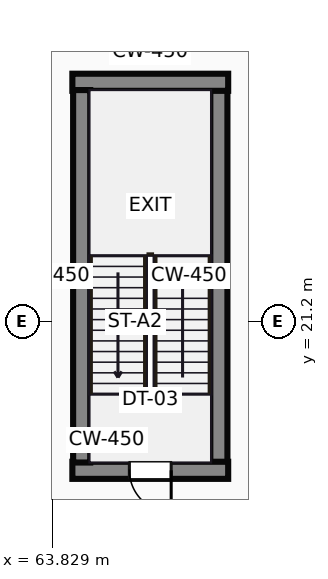
"""IFC4 building model, lengths in metres.
Left out: names, types, materials, properties, quantities, classifications, styles, units other than length and angle.
Written with IfcOpenShell. Run it as: python <this file> out.ifc"""

import sys

from ifc_helpers import new_model, si_unit, direction, frame, frame_2d, origin, place, context, subcontext, project, spatial, rectangle, extrude, source, transform, mapped, element, fill, save


model = new_model("IFC4")
c1 = context("Model", 3, precision=1e-05, world=origin(), true_north=direction((0.0, 1.0)))
c2 = subcontext(c1, "Body", "Model", "MODEL_VIEW")
j1 = project(units=[si_unit("LENGTHUNIT", "METRE"), si_unit("PLANEANGLEUNIT", "RADIAN")], contexts=[c1])
p1 = place(None, origin())
s1 = spatial("IfcSite", under=j1, at=p1, CompositionType="ELEMENT")
p2 = place(p1, origin())
s2 = spatial("IfcBuilding", under=s1, at=p2, CompositionType="ELEMENT")
p3 = place(p2, frame((0.0, 0.0, 16.0)))
s3 = spatial("IfcBuildingStorey", under=s2, at=p3, CompositionType="ELEMENT", Elevation=16.0)
m1 = source(origin(), c2, "Body", "SweptSolid", [
    extrude(rectangle(XDim=4.1, YDim=0.45, at=frame_2d((2.05, 0.0))), origin(), (0.0, 0.0, 1.0), 5.0),
])
p4 = place(p3, frame((64.35, 17.295, 0.0), z_axis=(0.0, 0.0, 1.0), x_axis=(1.0, 0.0, 0.0)))
e1 = element("IfcWall", 1, at=p4, inside=s3, PredefinedType="SHEAR", context=c2, shape_type="MappedRepresentation", body=[
    mapped(m1, transform((0.0, 0.0, 0.0))),
])
p5 = place(p4, frame((1.5, 0.0, 0.0)))
e2 = element("IfcOpeningElement", 2, at=p5, cuts=e1, PredefinedType="OPENING", context=c2, shape_type="SweptSolid", body=[
    extrude(rectangle(XDim=1.1, YDim=2.15, at=frame_2d((0.55, 1.075))), frame((0.0, 0.235, 0.0), z_axis=(0.0, -1.0, 0.0), x_axis=(1.0, 0.0, 0.0)), (0.0, 0.0, 1.0), 0.47),
])
m2 = source(origin(), c2, "Body", "SweptSolid", [
    extrude(rectangle(XDim=9.8, YDim=0.45, at=frame_2d((4.9, 0.0))), origin(), (0.0, 0.0, 1.0), 5.0),
])
for number, where, z_axis, x_axis in (
    (3, (64.595, 17.5, 0.0), (0.0, 0.0, 1.0), (0.0, 1.0, 0.0)),
    (4, (68.205, 17.5, 0.0), (0.0, 0.0, 1.0), (0.0, 1.0, 0.0)),
):
    element("IfcWall", number, at=place(p3, frame(where, z_axis=z_axis, x_axis=x_axis)), inside=s3, PredefinedType="SHEAR", context=c2, shape_type="MappedRepresentation", body=[
        mapped(m2, transform((0.0, 0.0, 0.0))),
    ])
p6 = place(p3, frame((64.35, 27.505, 0.0), z_axis=(0.0, 0.0, 1.0), x_axis=(1.0, 0.0, 0.0)))
e5 = element("IfcWall", 5, at=p6, inside=s3, PredefinedType="SHEAR", context=c2, shape_type="MappedRepresentation", body=[
    mapped(m1, transform((0.0, 0.0, 0.0))),
])
m3 = source(origin(), c2, "Body", "SweptSolid", [
    extrude(rectangle(XDim=1.1, YDim=2.15, at=frame_2d((0.55, 1.075))), frame((0.0, 0.025, 0.0), z_axis=(0.0, -1.0, 0.0), x_axis=(1.0, 0.0, 0.0)), (0.0, 0.0, 1.0), 0.05),
])
p7 = place(p5, origin())
e6 = element("IfcDoor", 6, at=p7, inside=s3, OperationType="SINGLE_SWING_RIGHT", PredefinedType="DOOR", context=c2, shape_type="MappedRepresentation", body=[
    mapped(m3, transform((0.0, 0.0, 0.0))),
])
fill(e2, e6)
save(model, sys.argv[1])
